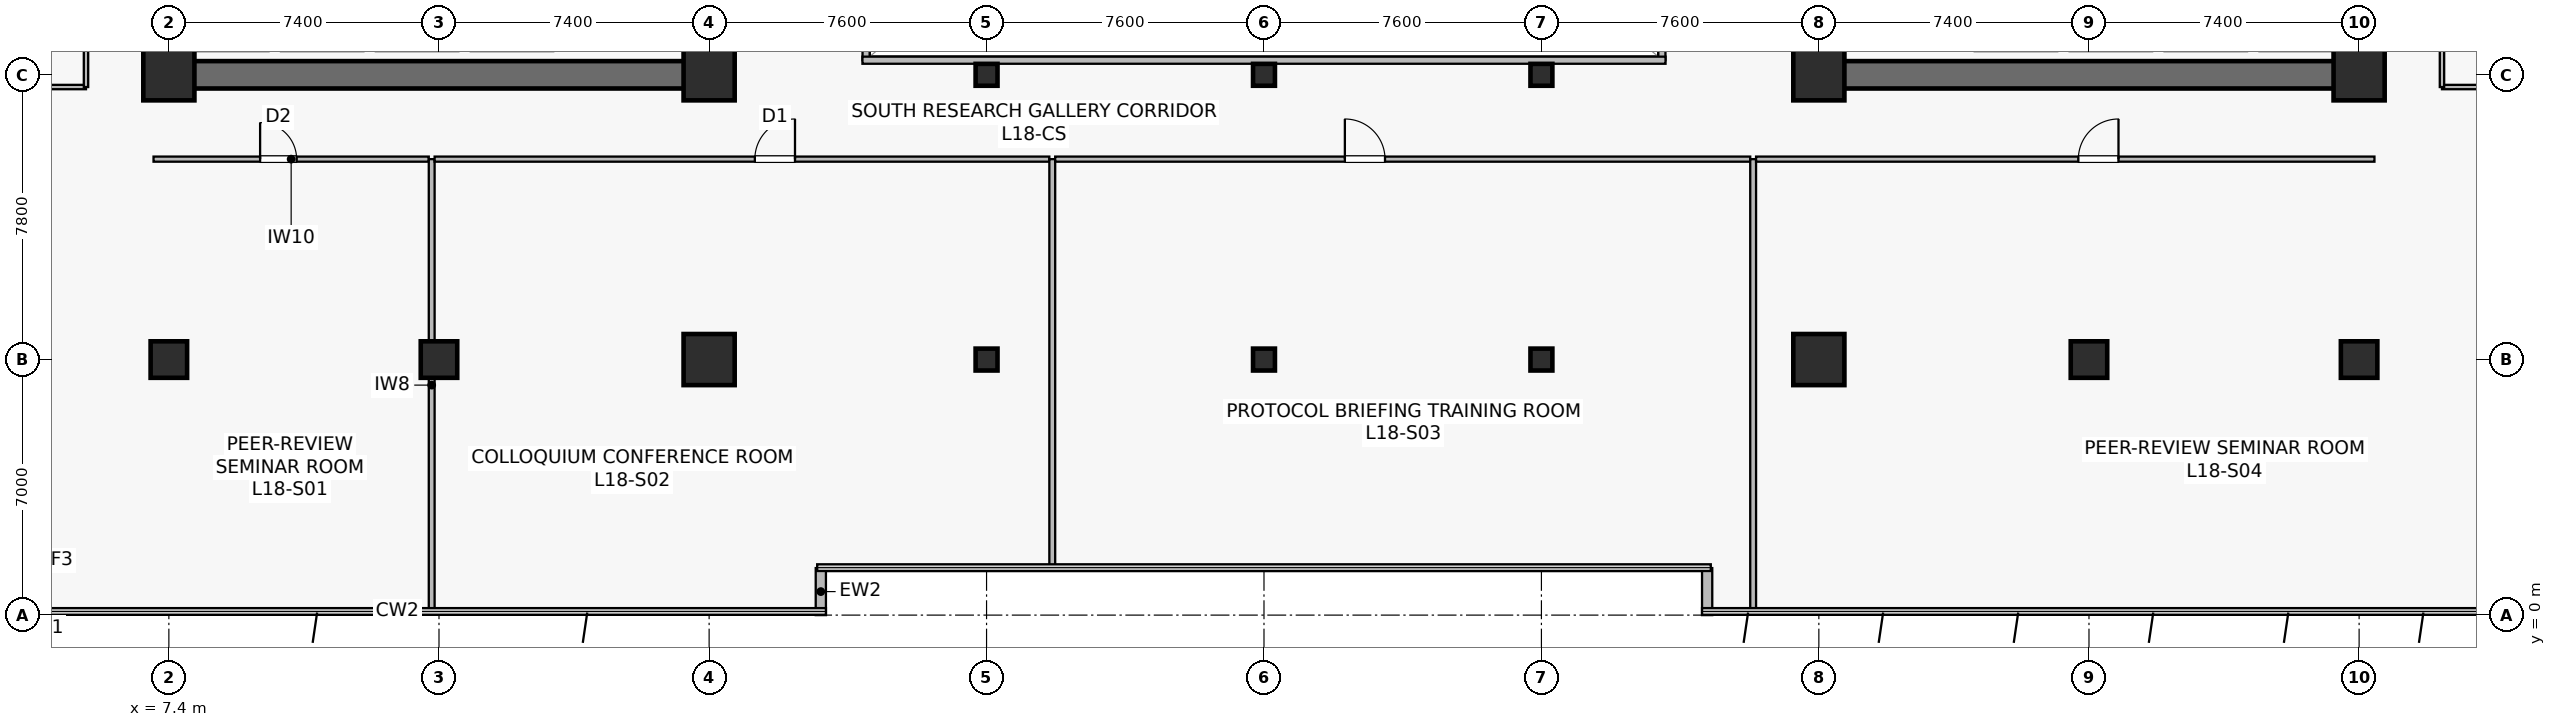
"""IFC4 building model, lengths in metres.
Left out: names, types, materials, properties, quantities, classifications, styles, units other than length and angle.
Written with IfcOpenShell. Run it as: python <this file> out.ifc"""

import sys

from ifc_helpers import new_model, si_unit, direction, frame, frame_2d, origin, origin_2d, place, context, subcontext, project, spatial, rectangle, hollow_rectangle, extrude, source, transform, mapped, element, fill, save


model = new_model("IFC4")
c1 = context("Model", 3, precision=1e-05, world=origin(), true_north=direction((0.0, 1.0)))
c2 = subcontext(c1, "Body", "Model", "MODEL_VIEW")
j1 = project(units=[si_unit("LENGTHUNIT", "METRE"), si_unit("PLANEANGLEUNIT", "RADIAN")], contexts=[c1])
p1 = place(None, origin())
s1 = spatial("IfcSite", under=j1, at=p1, CompositionType="ELEMENT")
p2 = place(p1, origin())
s2 = spatial("IfcBuilding", under=s1, at=p2, CompositionType="ELEMENT")
p3 = place(p2, frame((0.0, 0.0, 74.4)))
s3 = spatial("IfcBuildingStorey", under=s2, at=p3, CompositionType="ELEMENT", Elevation=74.4)
p4 = place(p3, frame((7.025, 14.8, 0.0), z_axis=(0.0, 0.0, 1.0), x_axis=(1.0, 0.0, 0.0)))
e1 = element("IfcWall", 1, at=p4, inside=s3, PredefinedType="SHEAR", context=c2, shape_type="SweptSolid", body=[
    extrude(rectangle(XDim=15.55, YDim=0.75, at=frame_2d((7.775, 0.0))), origin(), (0.0, 0.0, 1.0), 3.78),
])
p5 = place(p3, frame((7.4, 15.175, 0.0), z_axis=(0.0, 0.0, 1.0), x_axis=(0.0, 1.0, 0.0)))
e2 = element("IfcWall", 2, at=p5, inside=s3, PredefinedType="SHEAR", context=c2, shape_type="SweptSolid", body=[
    extrude(rectangle(XDim=18.25, YDim=0.75, at=frame_2d((9.125, 0.0))), origin(), (0.0, 0.0, 1.0), 3.78),
])
p6 = place(p3, frame((22.2, 15.175, 0.0), z_axis=(0.0, 0.0, 1.0), x_axis=(0.0, 1.0, 0.0)))
e3 = element("IfcWall", 3, at=p6, inside=s3, PredefinedType="SHEAR", context=c2, shape_type="SweptSolid", body=[
    extrude(rectangle(XDim=18.25, YDim=0.75, at=frame_2d((9.125, 0.0))), origin(), (0.0, 0.0, 1.0), 3.78),
])
p7 = place(p6, frame((3.375, 0.0, 0.0)))
e4 = element("IfcOpeningElement", 4, at=p7, cuts=e3, PredefinedType="OPENING", context=c2, shape_type="SweptSolid", body=[
    extrude(rectangle(XDim=1.42, YDim=2.2, at=frame_2d((0.71, 1.1))), frame((0.0, 0.385, 0.0), z_axis=(0.0, -1.0, 0.0), x_axis=(1.0, 0.0, 0.0)), (0.0, 0.0, 1.0), 0.77),
])
p8 = place(p3, frame((52.225, 14.8, 0.0), z_axis=(0.0, 0.0, 1.0), x_axis=(1.0, 0.0, 0.0)))
e5 = element("IfcWall", 5, at=p8, inside=s3, PredefinedType="SHEAR", context=c2, shape_type="SweptSolid", body=[
    extrude(rectangle(XDim=15.55, YDim=0.75, at=frame_2d((7.775, 0.0))), origin(), (0.0, 0.0, 1.0), 3.78),
])
p9 = place(p3, frame((52.6, 15.175, 0.0), z_axis=(0.0, 0.0, 1.0), x_axis=(0.0, 1.0, 0.0)))
e6 = element("IfcWall", 6, at=p9, inside=s3, PredefinedType="SHEAR", context=c2, shape_type="SweptSolid", body=[
    extrude(rectangle(XDim=18.25, YDim=0.75, at=frame_2d((9.125, 0.0))), origin(), (0.0, 0.0, 1.0), 3.78),
])
p10 = place(p9, frame((3.375, 0.0, 0.0)))
e7 = element("IfcOpeningElement", 7, at=p10, cuts=e6, PredefinedType="OPENING", context=c2, shape_type="SweptSolid", body=[
    extrude(rectangle(XDim=1.42, YDim=2.2, at=frame_2d((0.71, 1.1))), frame((0.0, 0.385, 0.0), z_axis=(0.0, -1.0, 0.0), x_axis=(1.0, 0.0, 0.0)), (0.0, 0.0, 1.0), 0.77),
])
p11 = place(p3, frame((67.4, 15.175, 0.0), z_axis=(0.0, 0.0, 1.0), x_axis=(0.0, 1.0, 0.0)))
e8 = element("IfcWall", 8, at=p11, inside=s3, PredefinedType="SHEAR", context=c2, shape_type="SweptSolid", body=[
    extrude(rectangle(XDim=18.25, YDim=0.75, at=frame_2d((9.125, 0.0))), origin(), (0.0, 0.0, 1.0), 3.78),
])
m1 = source(origin(), c2, "Body", "SweptSolid", [
    extrude(rectangle(XDim=1.0, YDim=1.0, at=origin_2d()), origin(), (0.0, 0.0, 1.0), 4.1),
])
p12 = place(p3, frame((14.8, 7.0, 0.0), z_axis=(0.0, 0.0, 1.0), x_axis=(1.0, 0.0, 0.0)))
e9 = element("IfcColumn", 9, at=p12, inside=s3, PredefinedType="COLUMN", context=c2, shape_type="MappedRepresentation", body=[
    mapped(m1, transform((0.0, 0.0, 0.0), scale=1.0)),
])
m2 = source(origin(), c2, "Body", "SweptSolid", [
    extrude(rectangle(XDim=1.4, YDim=1.4, at=origin_2d()), origin(), (0.0, 0.0, 1.0), 4.1),
])
for number, where, z_axis, x_axis in (
    (10, (22.2, 7.0, 0.0), (0.0, 0.0, 1.0), (1.0, 0.0, 0.0)),
    (11, (7.4, 14.8, 0.0), (0.0, 0.0, 1.0), (1.0, 0.0, 0.0)),
    (12, (22.2, 14.8, 0.0), (0.0, 0.0, 1.0), (1.0, 0.0, 0.0)),
    (13, (52.6, 7.0, 0.0), (0.0, 0.0, 1.0), (1.0, 0.0, 0.0)),
):
    element("IfcColumn", number, at=place(p3, frame(where, z_axis=z_axis, x_axis=x_axis)), inside=s3, PredefinedType="COLUMN", context=c2, shape_type="MappedRepresentation", body=[
        mapped(m2, transform((0.0, 0.0, 0.0), scale=1.0)),
    ])
p13 = place(p3, frame((60.0, 7.0, 0.0), z_axis=(0.0, 0.0, 1.0), x_axis=(1.0, 0.0, 0.0)))
e14 = element("IfcColumn", 14, at=p13, inside=s3, PredefinedType="COLUMN", context=c2, shape_type="MappedRepresentation", body=[
    mapped(m1, transform((0.0, 0.0, 0.0), scale=1.0)),
])
for number, where, z_axis, x_axis in (
    (15, (52.6, 14.8, 0.0), (0.0, 0.0, 1.0), (1.0, 0.0, 0.0)),
    (16, (67.4, 14.8, 0.0), (0.0, 0.0, 1.0), (1.0, 0.0, 0.0)),
):
    element("IfcColumn", number, at=place(p3, frame(where, z_axis=z_axis, x_axis=x_axis)), inside=s3, PredefinedType="COLUMN", context=c2, shape_type="MappedRepresentation", body=[
        mapped(m2, transform((0.0, 0.0, 0.0), scale=1.0)),
    ])
for number, where, z_axis, x_axis in (
    (17, (7.4, 7.0, 0.0), (0.0, 0.0, 1.0), (1.0, 0.0, 0.0)),
    (18, (67.4, 7.0, 0.0), (0.0, 0.0, 1.0), (1.0, 0.0, 0.0)),
):
    element("IfcColumn", number, at=place(p3, frame(where, z_axis=z_axis, x_axis=x_axis)), inside=s3, PredefinedType="COLUMN", context=c2, shape_type="MappedRepresentation", body=[
        mapped(m1, transform((0.0, 0.0, 0.0), scale=1.0)),
    ])
m3 = source(origin(), c2, "Body", "SweptSolid", [
    extrude(hollow_rectangle(XDim=0.6, YDim=0.6, WallThickness=0.028, at=origin_2d()), origin(), (0.0, 0.0, 1.0), 4.1),
])
for number, where, z_axis, x_axis in (
    (19, (29.8, 7.0, 0.0), (0.0, 0.0, 1.0), (1.0, 0.0, 0.0)),
    (20, (29.8, 14.8, 0.0), (0.0, 0.0, 1.0), (1.0, 0.0, 0.0)),
    (21, (37.4, 7.0, 0.0), (0.0, 0.0, 1.0), (1.0, 0.0, 0.0)),
    (22, (37.4, 14.8, 0.0), (0.0, 0.0, 1.0), (1.0, 0.0, 0.0)),
    (23, (45.0, 7.0, 0.0), (0.0, 0.0, 1.0), (1.0, 0.0, 0.0)),
    (24, (45.0, 14.8, 0.0), (0.0, 0.0, 1.0), (1.0, 0.0, 0.0)),
):
    element("IfcColumn", number, at=place(p3, frame(where, z_axis=z_axis, x_axis=x_axis)), inside=s3, PredefinedType="COLUMN", context=c2, shape_type="MappedRepresentation", body=[
        mapped(m3, transform((0.0, 0.0, 0.0), scale=1.0)),
    ])
for number, where, z_axis, x_axis in (
    (25, (25.26, 0.0, 0.0), (0.0, 0.0, 1.0), (0.0, 1.0, 0.0)),
    (26, (49.54, 1.288, 0.0), (0.0, 0.0, 1.0), (0.0, -1.0, 0.0)),
):
    element("IfcWall", number, at=place(p3, frame(where, z_axis=z_axis, x_axis=x_axis)), inside=s3, PredefinedType="STANDARD", context=c2, shape_type="SweptSolid", body=[
        extrude(rectangle(XDim=1.288, YDim=0.28, at=frame_2d((0.644, 0.0))), origin(), (0.0, 0.0, 1.0), 3.78),
    ])
p14 = place(p3, frame((26.5, 15.2, 0.0), z_axis=(0.0, 0.0, 1.0), x_axis=(0.0, 1.0, 0.0)))
e27 = element("IfcWall", 27, at=p14, inside=s3, PredefinedType="SOLIDWALL", context=c2, shape_type="SweptSolid", body=[
    extrude(rectangle(XDim=18.2, YDim=0.195, at=frame_2d((9.1, 0.0))), origin(), (0.0, 0.0, 1.0), 3.78),
])
p15 = place(p14, frame((1.8, 0.0, 0.9)))
e28 = element("IfcOpeningElement", 28, at=p15, cuts=e27, PredefinedType="OPENING", context=c2, shape_type="SweptSolid", body=[
    extrude(rectangle(XDim=1.5, YDim=1.4, at=frame_2d((0.75, 0.7))), frame((0.0, 0.107, 0.0), z_axis=(0.0, -1.0, 0.0), x_axis=(1.0, 0.0, 0.0)), (0.0, 0.0, 1.0), 0.215),
])
p16 = place(p14, frame((13.2, 0.0, 0.9)))
e29 = element("IfcOpeningElement", 29, at=p16, cuts=e27, PredefinedType="OPENING", context=c2, shape_type="SweptSolid", body=[
    extrude(rectangle(XDim=1.5, YDim=1.4, at=frame_2d((0.75, 0.7))), frame((0.0, 0.107, 0.0), z_axis=(0.0, -1.0, 0.0), x_axis=(1.0, 0.0, 0.0)), (0.0, 0.0, 1.0), 0.215),
])
p17 = place(p3, frame((48.3, 15.2, 0.0), z_axis=(0.0, 0.0, 1.0), x_axis=(0.0, 1.0, 0.0)))
e30 = element("IfcWall", 30, at=p17, inside=s3, PredefinedType="SOLIDWALL", context=c2, shape_type="SweptSolid", body=[
    extrude(rectangle(XDim=18.2, YDim=0.195, at=frame_2d((9.1, 0.0))), origin(), (0.0, 0.0, 1.0), 3.78),
])
p18 = place(p17, frame((1.8, 0.0, 0.9)))
e31 = element("IfcOpeningElement", 31, at=p18, cuts=e30, PredefinedType="OPENING", context=c2, shape_type="SweptSolid", body=[
    extrude(rectangle(XDim=1.5, YDim=1.4, at=frame_2d((0.75, 0.7))), frame((0.0, 0.107, 0.0), z_axis=(0.0, -1.0, 0.0), x_axis=(1.0, 0.0, 0.0)), (0.0, 0.0, 1.0), 0.215),
])
p19 = place(p17, frame((13.2, 0.0, 0.9)))
e32 = element("IfcOpeningElement", 32, at=p19, cuts=e30, PredefinedType="OPENING", context=c2, shape_type="SweptSolid", body=[
    extrude(rectangle(XDim=1.5, YDim=1.4, at=frame_2d((0.75, 0.7))), frame((0.0, 0.107, 0.0), z_axis=(0.0, -1.0, 0.0), x_axis=(1.0, 0.0, 0.0)), (0.0, 0.0, 1.0), 0.215),
])
p20 = place(p3, frame((26.4, 15.2, 0.0), z_axis=(0.0, 0.0, 1.0), x_axis=(1.0, 0.0, 0.0)))
e33 = element("IfcWall", 33, at=p20, inside=s3, PredefinedType="SOLIDWALL", context=c2, shape_type="SweptSolid", body=[
    extrude(rectangle(XDim=22.0, YDim=0.195, at=frame_2d((11.0, 0.0))), origin(), (0.0, 0.0, 1.0), 3.78),
])
p21 = place(p3, frame((6.98, 12.49, 0.0), z_axis=(0.0, 0.0, 1.0), x_axis=(1.0, 0.0, 0.0)))
e34 = element("IfcWall", 34, at=p21, inside=s3, PredefinedType="PARTITIONING", context=c2, shape_type="SweptSolid", body=[
    extrude(rectangle(XDim=7.54, YDim=0.14, at=frame_2d((3.77, 0.0))), origin(), (0.0, 0.0, 1.0), 3.265),
])
p22 = place(p21, frame((2.92, 0.0, 0.0)))
e35 = element("IfcOpeningElement", 35, at=p22, cuts=e34, PredefinedType="OPENING", context=c2, shape_type="SweptSolid", body=[
    extrude(rectangle(XDim=1.0, YDim=2.15, at=frame_2d((0.5, 1.075))), frame((0.0, 0.08, 0.0), z_axis=(0.0, -1.0, 0.0), x_axis=(1.0, 0.0, 0.0)), (0.0, 0.0, 1.0), 0.16),
])
p23 = place(p3, frame((14.6, 0.11, 0.0), z_axis=(0.0, 0.0, 1.0), x_axis=(0.0, 1.0, 0.0)))
e36 = element("IfcWall", 36, at=p23, inside=s3, PredefinedType="PARTITIONING", context=c2, shape_type="SweptSolid", body=[
    extrude(rectangle(XDim=12.38, YDim=0.16, at=frame_2d((6.19, 0.0))), origin(), (0.0, 0.0, 1.0), 3.015),
])
p24 = place(p3, frame((14.68, 12.49, 0.0), z_axis=(0.0, 0.0, 1.0), x_axis=(1.0, 0.0, 0.0)))
e37 = element("IfcWall", 37, at=p24, inside=s3, PredefinedType="PARTITIONING", context=c2, shape_type="SweptSolid", body=[
    extrude(rectangle(XDim=16.84, YDim=0.14, at=frame_2d((8.42, 0.0))), origin(), (0.0, 0.0, 1.0), 3.115),
])
p25 = place(p24, frame((8.772, 0.0, 0.0)))
e38 = element("IfcOpeningElement", 38, at=p25, cuts=e37, PredefinedType="OPENING", context=c2, shape_type="SweptSolid", body=[
    extrude(rectangle(XDim=1.1, YDim=2.18, at=frame_2d((0.55, 1.09))), frame((0.0, 0.08, 0.0), z_axis=(0.0, -1.0, 0.0), x_axis=(1.0, 0.0, 0.0)), (0.0, 0.0, 1.0), 0.16),
])
p26 = place(p3, frame((31.6, 1.31, 0.0), z_axis=(0.0, 0.0, 1.0), x_axis=(0.0, 1.0, 0.0)))
e39 = element("IfcWall", 39, at=p26, inside=s3, PredefinedType="PARTITIONING", context=c2, shape_type="SweptSolid", body=[
    extrude(rectangle(XDim=11.18, YDim=0.16, at=frame_2d((5.59, 0.0))), origin(), (0.0, 0.0, 1.0), 3.015),
])
p27 = place(p3, frame((31.68, 12.49, 0.0), z_axis=(0.0, 0.0, 1.0), x_axis=(1.0, 0.0, 0.0)))
e40 = element("IfcWall", 40, at=p27, inside=s3, PredefinedType="PARTITIONING", context=c2, shape_type="SweptSolid", body=[
    extrude(rectangle(XDim=19.04, YDim=0.14, at=frame_2d((9.52, 0.0))), origin(), (0.0, 0.0, 1.0), 3.115),
])
p28 = place(p27, frame((7.936, 0.0, 0.0)))
e41 = element("IfcOpeningElement", 41, at=p28, cuts=e40, PredefinedType="OPENING", context=c2, shape_type="SweptSolid", body=[
    extrude(rectangle(XDim=1.1, YDim=2.18, at=frame_2d((0.55, 1.09))), frame((0.0, 0.08, 0.0), z_axis=(0.0, -1.0, 0.0), x_axis=(1.0, 0.0, 0.0)), (0.0, 0.0, 1.0), 0.16),
])
p29 = place(p3, frame((50.8, 0.11, 0.0), z_axis=(0.0, 0.0, 1.0), x_axis=(0.0, 1.0, 0.0)))
e42 = element("IfcWall", 42, at=p29, inside=s3, PredefinedType="PARTITIONING", context=c2, shape_type="SweptSolid", body=[
    extrude(rectangle(XDim=12.38, YDim=0.16, at=frame_2d((6.19, 0.0))), origin(), (0.0, 0.0, 1.0), 3.015),
])
p30 = place(p3, frame((50.88, 12.49, 0.0), z_axis=(0.0, 0.0, 1.0), x_axis=(1.0, 0.0, 0.0)))
e43 = element("IfcWall", 43, at=p30, inside=s3, PredefinedType="PARTITIONING", context=c2, shape_type="SweptSolid", body=[
    extrude(rectangle(XDim=16.94, YDim=0.14, at=frame_2d((8.47, 0.0))), origin(), (0.0, 0.0, 1.0), 3.115),
])
p31 = place(p30, frame((8.828, 0.0, 0.0)))
e44 = element("IfcOpeningElement", 44, at=p31, cuts=e43, PredefinedType="OPENING", context=c2, shape_type="SweptSolid", body=[
    extrude(rectangle(XDim=1.1, YDim=2.18, at=frame_2d((0.55, 1.09))), frame((0.0, 0.08, 0.0), z_axis=(0.0, -1.0, 0.0), x_axis=(1.0, 0.0, 0.0)), (0.0, 0.0, 1.0), 0.16),
])
p32 = place(p3, frame((0.11, 14.465, 0.0), z_axis=(0.0, 0.0, 1.0), x_axis=(1.0, 0.0, 0.0)))
e45 = element("IfcWall", 45, at=p32, inside=s3, PredefinedType="PARTITIONING", context=c2, shape_type="SweptSolid", body=[
    extrude(rectangle(XDim=5.02, YDim=0.12, at=frame_2d((2.51, 0.0))), origin(), (0.0, 0.0, 1.0), 3.78),
])
p33 = place(p3, frame((5.13, 14.465, 0.0), z_axis=(0.0, 0.0, 1.0), x_axis=(0.0, 1.0, 0.0)))
e46 = element("IfcWall", 46, at=p33, inside=s3, PredefinedType="PARTITIONING", context=c2, shape_type="SweptSolid", body=[
    extrude(rectangle(XDim=5.875, YDim=0.12, at=frame_2d((2.938, 0.0))), origin(), (0.0, 0.0, 1.0), 3.78),
])
p34 = place(p33, frame((2.488, 0.0, 0.0)))
e47 = element("IfcOpeningElement", 47, at=p34, cuts=e46, PredefinedType="OPENING", context=c2, shape_type="SweptSolid", body=[
    extrude(rectangle(XDim=0.9, YDim=2.1, at=frame_2d((0.45, 1.05))), frame((0.0, 0.07, 0.0), z_axis=(0.0, -1.0, 0.0), x_axis=(1.0, 0.0, 0.0)), (0.0, 0.0, 1.0), 0.14),
])
p35 = place(p3, frame((69.67, 14.465, 0.0), z_axis=(0.0, 0.0, 1.0), x_axis=(1.0, 0.0, 0.0)))
e48 = element("IfcWall", 48, at=p35, inside=s3, PredefinedType="PARTITIONING", context=c2, shape_type="SweptSolid", body=[
    extrude(rectangle(XDim=5.02, YDim=0.12, at=frame_2d((2.51, 0.0))), origin(), (0.0, 0.0, 1.0), 3.78),
])
p36 = place(p3, frame((69.67, 14.465, 0.0), z_axis=(0.0, 0.0, 1.0), x_axis=(0.0, 1.0, 0.0)))
e49 = element("IfcWall", 49, at=p36, inside=s3, PredefinedType="PARTITIONING", context=c2, shape_type="SweptSolid", body=[
    extrude(rectangle(XDim=19.67, YDim=0.12, at=frame_2d((9.835, 0.0))), origin(), (0.0, 0.0, 1.0), 3.78),
])
p37 = place(p36, frame((9.385, 0.0, 0.0)))
e50 = element("IfcOpeningElement", 50, at=p37, cuts=e49, PredefinedType="OPENING", context=c2, shape_type="SweptSolid", body=[
    extrude(rectangle(XDim=0.9, YDim=2.1, at=frame_2d((0.45, 1.05))), frame((0.0, 0.07, 0.0), z_axis=(0.0, -1.0, 0.0), x_axis=(1.0, 0.0, 0.0)), (0.0, 0.0, 1.0), 0.14),
])
m4 = source(origin(), c2, "Body", "SweptSolid", [
    extrude(rectangle(XDim=1.0, YDim=2.15, at=frame_2d((0.5, 1.075))), frame((0.0, 0.025, 0.0), z_axis=(0.0, -1.0, 0.0), x_axis=(1.0, 0.0, 0.0)), (0.0, 0.0, 1.0), 0.05),
])
p38 = place(p22, origin())
e51 = element("IfcDoor", 51, at=p38, inside=s3, OperationType="SINGLE_SWING_LEFT", PredefinedType="DOOR", context=c2, shape_type="MappedRepresentation", body=[
    mapped(m4, transform((0.0, 0.0, 0.0), scale=1.0)),
])
fill(e35, e51)
m5 = source(origin(), c2, "Body", "SweptSolid", [
    extrude(rectangle(XDim=1.1, YDim=2.18, at=frame_2d((0.55, 1.09))), frame((0.0, 0.025, 0.0), z_axis=(0.0, -1.0, 0.0), x_axis=(1.0, 0.0, 0.0)), (0.0, 0.0, 1.0), 0.05),
])
p39 = place(p25, origin())
e52 = element("IfcDoor", 52, at=p39, inside=s3, OperationType="SINGLE_SWING_RIGHT", PredefinedType="DOOR", context=c2, shape_type="MappedRepresentation", body=[
    mapped(m5, transform((0.0, 0.0, 0.0), scale=1.0)),
])
fill(e38, e52)
p40 = place(p28, origin())
e53 = element("IfcDoor", 53, at=p40, inside=s3, OperationType="SINGLE_SWING_LEFT", PredefinedType="DOOR", context=c2, shape_type="MappedRepresentation", body=[
    mapped(m5, transform((0.0, 0.0, 0.0), scale=1.0)),
])
fill(e41, e53)
p41 = place(p31, origin())
e54 = element("IfcDoor", 54, at=p41, inside=s3, OperationType="SINGLE_SWING_RIGHT", PredefinedType="DOOR", context=c2, shape_type="MappedRepresentation", body=[
    mapped(m5, transform((0.0, 0.0, 0.0), scale=1.0)),
])
fill(e44, e54)
save(model, sys.argv[1])
